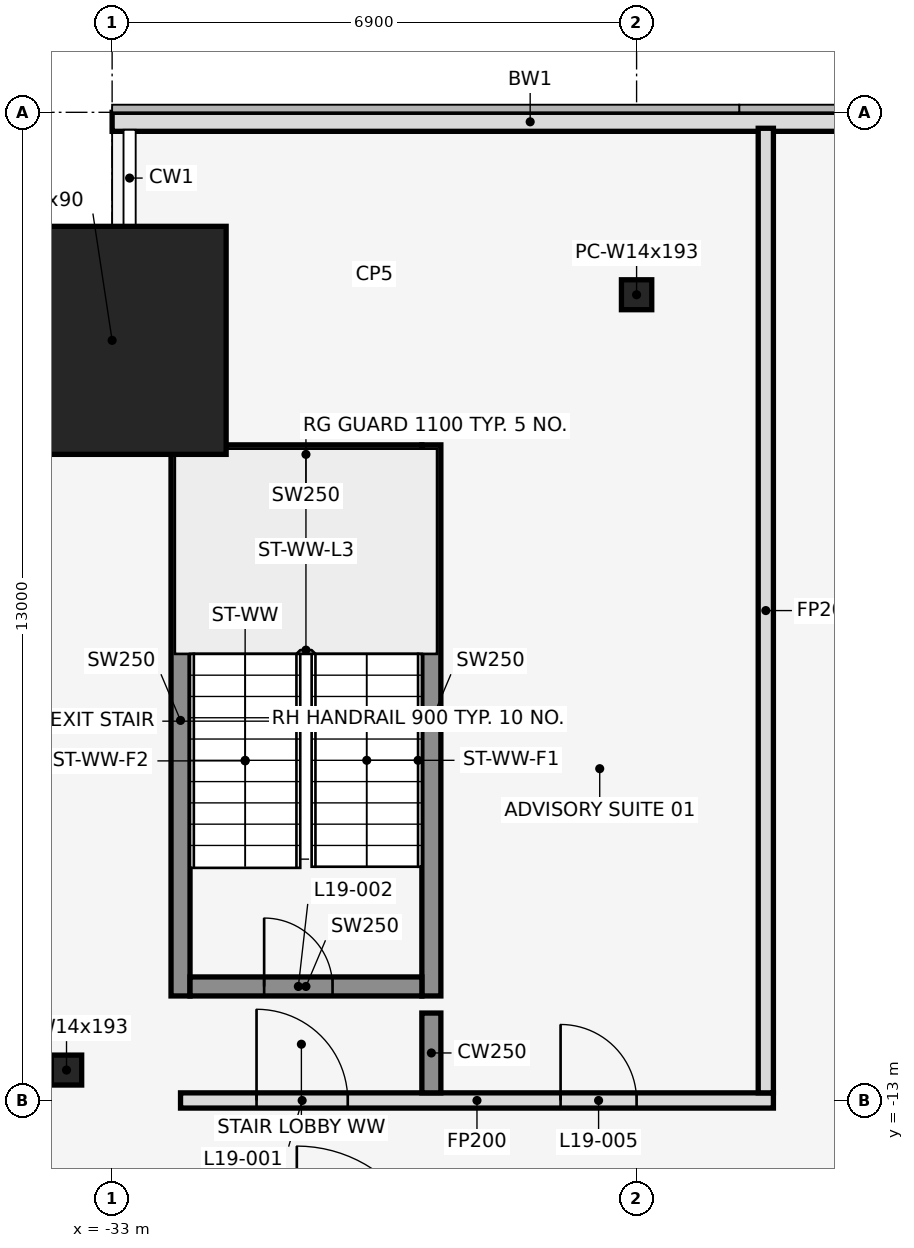
"""IFC4 building model, lengths in metres.
Left out: names, types, materials, properties, quantities, classifications, styles, units other than length and angle.
Written with IfcOpenShell. Run it as: python <this file> out.ifc"""

import sys

from ifc_helpers import new_model, si_unit, direction, frame, frame_2d, origin, origin_2d, place, context, subcontext, project, spatial, rectangle, hollow_rectangle, i_section, extrude, element, fill, save


model = new_model("IFC4")
c1 = context("Model", 3, precision=1e-05, world=origin(), true_north=direction((0.0, 1.0)))
c2 = subcontext(c1, "Body", "Model", "MODEL_VIEW")
j1 = project(units=[si_unit("LENGTHUNIT", "METRE"), si_unit("PLANEANGLEUNIT", "RADIAN")], contexts=[c1])
p1 = place(None, origin())
s1 = spatial("IfcSite", under=j1, at=p1, CompositionType="ELEMENT")
p2 = place(p1, origin())
s2 = spatial("IfcBuilding", under=s1, at=p2, CompositionType="ELEMENT")
p3 = place(p2, frame((0.0, 0.0, 94.0)))
s3 = spatial("IfcBuildingStorey", under=s2, at=p3, CompositionType="ELEMENT", Elevation=94.0)
p4 = place(p3, frame((-33.0, -3.0, 0.0), z_axis=(0.0, 0.0, 1.0), x_axis=(1.0, 0.0, 0.0)))
e1 = element("IfcColumn", 1, at=p4, inside=s3, PredefinedType="COLUMN", context=c2, shape_type="SweptSolid", body=[
    extrude(hollow_rectangle(XDim=3.0, YDim=3.0, WallThickness=0.09, at=origin_2d()), origin(), (0.0, 0.0, 1.0), 4.1),
])
for number, where, z_axis, x_axis in (
    (2, (-26.1, -2.4, 0.0), (0.0, 0.0, 1.0), (1.0, 0.0, 0.0)),
    (3, (-33.6, -12.6, 0.0), (0.0, 0.0, 1.0), (1.0, 0.0, 0.0)),
):
    element("IfcColumn", number, at=place(p3, frame(where, z_axis=z_axis, x_axis=x_axis)), inside=s3, PredefinedType="COLUMN", context=c2, shape_type="SweptSolid", body=[
        extrude(i_section(OverallWidth=0.399, OverallDepth=0.394, WebThickness=0.023, FlangeThickness=0.037, at=origin_2d()), origin(), (0.0, 0.0, 1.0), 4.1),
    ])
p5 = place(p3, frame((-22.0, -0.125, 0.0), z_axis=(0.0, 0.0, 1.0), x_axis=(-1.0, 0.0, 0.0)))
e4 = element("IfcWall", 4, at=p5, inside=s3, PredefinedType="STANDARD", context=c2, shape_type="SweptSolid", body=[
    extrude(rectangle(XDim=11.0, YDim=0.25, at=frame_2d((5.5, 0.0))), origin(), (0.0, 0.0, 1.0), 3.95),
])
for number, where, z_axis, x_axis in (
    (5, (-32.1, -11.625, 0.0), (0.0, 0.0, 1.0), (0.0, 1.0, 0.0)),
    (6, (-28.8, -11.625, 0.0), (0.0, 0.0, 1.0), (0.0, 1.0, 0.0)),
):
    element("IfcWall", number, at=place(p3, frame(where, z_axis=z_axis, x_axis=x_axis)), inside=s3, PredefinedType="SHEAR", context=c2, shape_type="SweptSolid", body=[
        extrude(rectangle(XDim=7.25, YDim=0.25, at=frame_2d((3.625, 0.0))), origin(), (0.0, 0.0, 1.0), 4.1),
    ])
p6 = place(p3, frame((-31.975, -11.5, 0.0), z_axis=(0.0, 0.0, 1.0), x_axis=(1.0, 0.0, 0.0)))
e7 = element("IfcWall", 7, at=p6, inside=s3, PredefinedType="SHEAR", context=c2, shape_type="SweptSolid", body=[
    extrude(rectangle(XDim=3.05, YDim=0.25, at=frame_2d((1.525, 0.0))), origin(), (0.0, 0.0, 1.0), 4.1),
])
p7 = place(p6, frame((0.975, 0.0, 0.0)))
e8 = element("IfcOpeningElement", 8, at=p7, cuts=e7, PredefinedType="OPENING", context=c2, shape_type="SweptSolid", body=[
    extrude(rectangle(XDim=0.9, YDim=2.1, at=frame_2d((0.45, 1.05))), frame((0.0, 0.137, 0.0), z_axis=(0.0, -1.0, 0.0), x_axis=(1.0, 0.0, 0.0)), (0.0, 0.0, 1.0), 0.274),
])
p8 = place(p3, frame((-31.975, -4.5, 0.0), z_axis=(0.0, 0.0, 1.0), x_axis=(1.0, 0.0, 0.0)))
e9 = element("IfcWall", 9, at=p8, inside=s3, PredefinedType="SHEAR", context=c2, shape_type="SweptSolid", body=[
    extrude(rectangle(XDim=3.05, YDim=0.25, at=frame_2d((1.525, 0.0))), origin(), (0.0, 0.0, 1.0), 4.1),
])
p9 = place(p3, frame((-32.1, -13.0, 0.0), z_axis=(0.0, 0.0, 1.0), x_axis=(1.0, 0.0, 0.0)))
e10 = element("IfcWall", 10, at=p9, inside=s3, PredefinedType="PARTITIONING", context=c2, shape_type="SweptSolid", body=[
    extrude(rectangle(XDim=7.8, YDim=0.2, at=frame_2d((3.9, 0.0))), origin(), (0.0, 0.0, 1.0), 3.018),
])
p10 = place(p9, frame((1.0, 0.0, 0.0)))
e11 = element("IfcOpeningElement", 11, at=p10, cuts=e10, PredefinedType="OPENING", context=c2, shape_type="SweptSolid", body=[
    extrude(rectangle(XDim=1.2, YDim=2.1, at=frame_2d((0.6, 1.05))), frame((0.0, 0.112, 0.0), z_axis=(0.0, -1.0, 0.0), x_axis=(1.0, 0.0, 0.0)), (0.0, 0.0, 1.0), 0.224),
])
p11 = place(p9, frame((5.0, 0.0, 0.0)))
e12 = element("IfcOpeningElement", 12, at=p11, cuts=e10, PredefinedType="OPENING", context=c2, shape_type="SweptSolid", body=[
    extrude(rectangle(XDim=1.0, YDim=2.1, at=frame_2d((0.5, 1.05))), frame((0.0, 0.112, 0.0), z_axis=(0.0, -1.0, 0.0), x_axis=(1.0, 0.0, 0.0)), (0.0, 0.0, 1.0), 0.224),
])
p12 = place(p3, frame((-28.8, -12.9, 0.0), z_axis=(0.0, 0.0, 1.0), x_axis=(0.0, 1.0, 0.0)))
e13 = element("IfcWall", 13, at=p12, inside=s3, PredefinedType="SHEAR", context=c2, shape_type="SweptSolid", body=[
    extrude(rectangle(XDim=1.05, YDim=0.25, at=frame_2d((0.525, 0.0))), origin(), (0.0, 0.0, 1.0), 4.1),
])
p13 = place(p3, frame((-24.4, -12.9, 0.0), z_axis=(0.0, 0.0, 1.0), x_axis=(0.0, 1.0, 0.0)))
e14 = element("IfcWall", 14, at=p13, inside=s3, PredefinedType="PARTITIONING", context=c2, shape_type="SweptSolid", body=[
    extrude(rectangle(XDim=12.69, YDim=0.2, at=frame_2d((6.345, 0.0))), origin(), (0.0, 0.0, 1.0), 3.018),
])
p14 = place(p10, origin())
e15 = element("IfcDoor", 15, at=p14, inside=s3, OperationType="SINGLE_SWING_LEFT", PredefinedType="DOOR", context=c2, shape_type="SweptSolid", body=[
    extrude(rectangle(XDim=1.2, YDim=2.1, at=frame_2d((0.6, 1.05))), frame((0.0, 0.025, 0.0), z_axis=(0.0, -1.0, 0.0), x_axis=(1.0, 0.0, 0.0)), (0.0, 0.0, 1.0), 0.05),
])
fill(e11, e15)
p15 = place(p7, origin())
e16 = element("IfcDoor", 16, at=p15, inside=s3, OperationType="SINGLE_SWING_LEFT", PredefinedType="DOOR", context=c2, shape_type="SweptSolid", body=[
    extrude(rectangle(XDim=0.9, YDim=2.1, at=frame_2d((0.45, 1.05))), frame((0.0, 0.025, 0.0), z_axis=(0.0, -1.0, 0.0), x_axis=(1.0, 0.0, 0.0)), (0.0, 0.0, 1.0), 0.05),
])
fill(e8, e16)
p16 = place(p11, origin())
e17 = element("IfcDoor", 17, at=p16, inside=s3, OperationType="SINGLE_SWING_LEFT", PredefinedType="DOOR", context=c2, shape_type="SweptSolid", body=[
    extrude(rectangle(XDim=1.0, YDim=2.1, at=frame_2d((0.5, 1.05))), frame((0.0, 0.025, 0.0), z_axis=(0.0, -1.0, 0.0), x_axis=(1.0, 0.0, 0.0)), (0.0, 0.0, 1.0), 0.05),
])
fill(e12, e17)
save(model, sys.argv[1])
